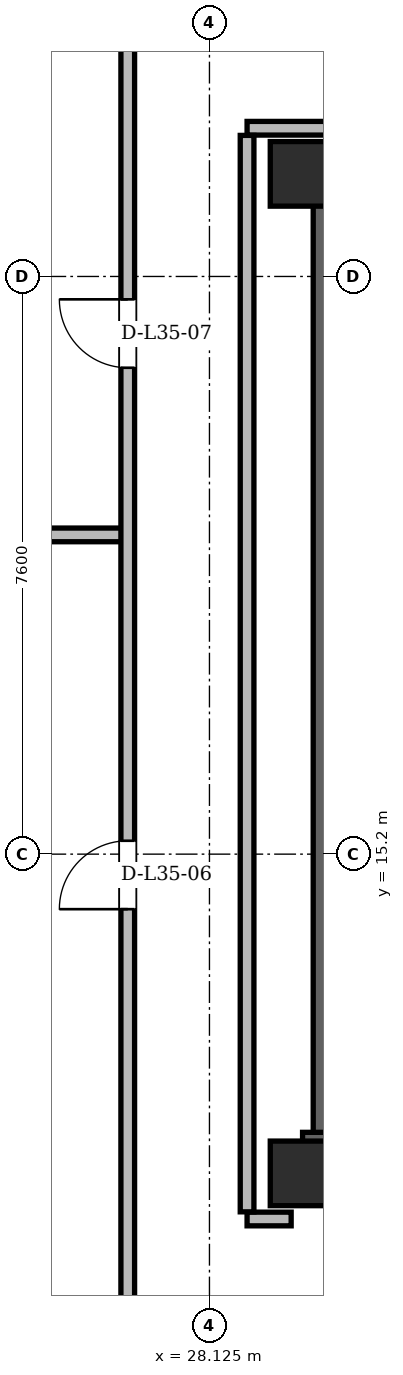
"""IFC4 building model, lengths in metres.
Left out: names, types, materials, properties, quantities, classifications, styles, units other than length and angle.
Written with IfcOpenShell. Run it as: python <this file> out.ifc"""

import sys

from ifc_helpers import new_model, si_unit, direction, frame, frame_2d, origin, origin_2d, place, context, subcontext, project, spatial, rectangle, hollow_rectangle, extrude, element, fill, save


model = new_model("IFC4")
c1 = context("Model", 3, precision=1e-05, world=origin(), true_north=direction((0.0, 1.0)))
c2 = subcontext(c1, "Body", "Model", "MODEL_VIEW")
j1 = project(units=[si_unit("LENGTHUNIT", "METRE"), si_unit("PLANEANGLEUNIT", "RADIAN")], contexts=[c1])
p1 = place(None, origin())
s1 = spatial("IfcSite", under=j1, at=p1, CompositionType="ELEMENT")
p2 = place(p1, origin())
s2 = spatial("IfcBuilding", under=s1, at=p2, CompositionType="ELEMENT")
p3 = place(p2, frame((0.0, 0.0, 133.8)))
s3 = spatial("IfcBuildingStorey", under=s2, at=p3, CompositionType="ELEMENT", Elevation=133.8)
for number, where, z_axis, x_axis in (
    (1, (29.35, 11.0, 0.0), (0.0, 0.0, 1.0), (1.0, 0.0, 0.0)),
    (2, (29.35, 24.15, 0.0), (0.0, 0.0, 1.0), (1.0, 0.0, 0.0)),
):
    element("IfcColumn", number, at=place(p3, frame(where, z_axis=z_axis, x_axis=x_axis)), inside=s3, PredefinedType="COLUMN", context=c2, shape_type="SweptSolid", body=[
        extrude(hollow_rectangle(XDim=0.85, YDim=0.85, WallThickness=0.07, at=origin_2d()), origin(), (0.0, 0.0, 1.0), 4.8),
    ])
p4 = place(p3, frame((29.715, 11.0, 0.0), z_axis=(0.0, 0.0, 1.0), x_axis=(0.0, 1.0, 0.0)))
e3 = element("IfcWall", 3, at=p4, inside=s3, PredefinedType="SHEAR", context=c2, shape_type="SweptSolid", body=[
    extrude(rectangle(XDim=13.3, YDim=0.45, at=frame_2d((6.65, 0.0))), origin(), (0.0, 0.0, 1.0), 4.56),
])
p5 = place(p3, frame((29.35, 11.315, 0.0), z_axis=(0.0, 0.0, 1.0), x_axis=(1.0, 0.0, 0.0)))
e4 = element("IfcWall", 4, at=p5, inside=s3, PredefinedType="SHEAR", context=c2, shape_type="SweptSolid", body=[
    extrude(rectangle(XDim=7.1, YDim=0.45, at=frame_2d((3.55, 0.0))), origin(), (0.0, 0.0, 1.0), 4.56),
])
p6 = place(p3, frame((32.391, 43.369, 0.0), z_axis=(0.0, 0.0, 1.0), x_axis=(-0.4999978793, -0.866026628168, 0.0)))
e5 = element("IfcWall", 5, at=p6, inside=s3, PredefinedType="SOLIDWALL", context=c2, shape_type="SweptSolid", body=[
    extrude(rectangle(XDim=35.194, YDim=0.34, at=frame_2d((17.597, 0.0))), origin(), (0.0, 0.0, 1.0), 3.55),
])
p7 = place(p3, frame((28.62, 10.4, 0.0), z_axis=(0.0, 0.0, 1.0), x_axis=(1.0, 0.0, 0.0)))
e6 = element("IfcWall", 6, at=p7, inside=s3, PredefinedType="PARTITIONING", context=c2, shape_type="SweptSolid", body=[
    extrude(rectangle(XDim=0.58, YDim=0.18, at=frame_2d((0.29, 0.0))), origin(), (0.0, 0.0, 1.0), 4.56),
])
p8 = place(p3, frame((18.753, 19.4, 0.0), z_axis=(0.0, 0.0, 1.0), x_axis=(1.0, 0.0, 0.0)))
e7 = element("IfcWall", 7, at=p8, inside=s3, PredefinedType="PARTITIONING", context=c2, shape_type="SweptSolid", body=[
    extrude(rectangle(XDim=8.297, YDim=0.18, at=frame_2d((4.148, 0.0))), origin(), (0.0, 0.0, 1.0), 3.55),
])
p9 = place(p3, frame((28.62, 24.75, 0.0), z_axis=(0.0, 0.0, 1.0), x_axis=(1.0, 0.0, 0.0)))
e8 = element("IfcWall", 8, at=p9, inside=s3, PredefinedType="PARTITIONING", context=c2, shape_type="SweptSolid", body=[
    extrude(rectangle(XDim=19.98, YDim=0.18, at=frame_2d((9.99, 0.0))), origin(), (0.0, 0.0, 1.0), 4.014),
])
p10 = place(p3, frame((27.05, 8.844, 0.0), z_axis=(0.0, 0.0, 1.0), x_axis=(0.0, 1.0, 0.0)))
e9 = element("IfcWall", 9, at=p10, inside=s3, PredefinedType="PARTITIONING", context=c2, shape_type="SweptSolid", body=[
    extrude(rectangle(XDim=17.462, YDim=0.18, at=frame_2d((8.731, 0.0))), origin(), (0.0, 0.0, 1.0), 4.014),
])
p11 = place(p10, frame((5.632, 0.0, 0.0)))
e10 = element("IfcOpeningElement", 10, at=p11, cuts=e9, PredefinedType="OPENING", context=c2, shape_type="SweptSolid", body=[
    extrude(rectangle(XDim=0.9, YDim=2.05, at=frame_2d((0.45, 1.025))), frame((0.0, 0.09, 0.0), z_axis=(0.0, -1.0, 0.0), x_axis=(1.0, 0.0, 0.0)), (0.0, 0.0, 1.0), 0.18),
])
p12 = place(p10, frame((12.755, 0.0, 0.0)))
e11 = element("IfcOpeningElement", 11, at=p12, cuts=e9, PredefinedType="OPENING", context=c2, shape_type="SweptSolid", body=[
    extrude(rectangle(XDim=0.9, YDim=2.05, at=frame_2d((0.45, 1.025))), frame((0.0, 0.09, 0.0), z_axis=(0.0, -1.0, 0.0), x_axis=(1.0, 0.0, 0.0)), (0.0, 0.0, 1.0), 0.18),
])
p13 = place(p3, frame((28.62, 10.494, 0.0), z_axis=(0.0, 0.0, 1.0), x_axis=(0.0, 1.0, 0.0)))
e12 = element("IfcWall", 12, at=p13, inside=s3, PredefinedType="PARTITIONING", context=c2, shape_type="SweptSolid", body=[
    extrude(rectangle(XDim=14.162, YDim=0.18, at=frame_2d((7.081, 0.0))), origin(), (0.0, 0.0, 1.0), 4.014),
])
p14 = place(p11, origin())
e13 = element("IfcDoor", 13, at=p14, inside=s3, OperationType="SINGLE_SWING_LEFT", PredefinedType="DOOR", context=c2, shape_type="SweptSolid", body=[
    extrude(rectangle(XDim=0.9, YDim=2.05, at=frame_2d((0.45, 1.025))), frame((0.0, 0.025, 0.0), z_axis=(0.0, -1.0, 0.0), x_axis=(1.0, 0.0, 0.0)), (0.0, 0.0, 1.0), 0.05),
])
fill(e10, e13)
p15 = place(p12, origin())
e14 = element("IfcDoor", 14, at=p15, inside=s3, OperationType="SINGLE_SWING_RIGHT", PredefinedType="DOOR", context=c2, shape_type="SweptSolid", body=[
    extrude(rectangle(XDim=0.9, YDim=2.05, at=frame_2d((0.45, 1.025))), frame((0.0, 0.025, 0.0), z_axis=(0.0, -1.0, 0.0), x_axis=(1.0, 0.0, 0.0)), (0.0, 0.0, 1.0), 0.05),
])
fill(e11, e14)
save(model, sys.argv[1])
